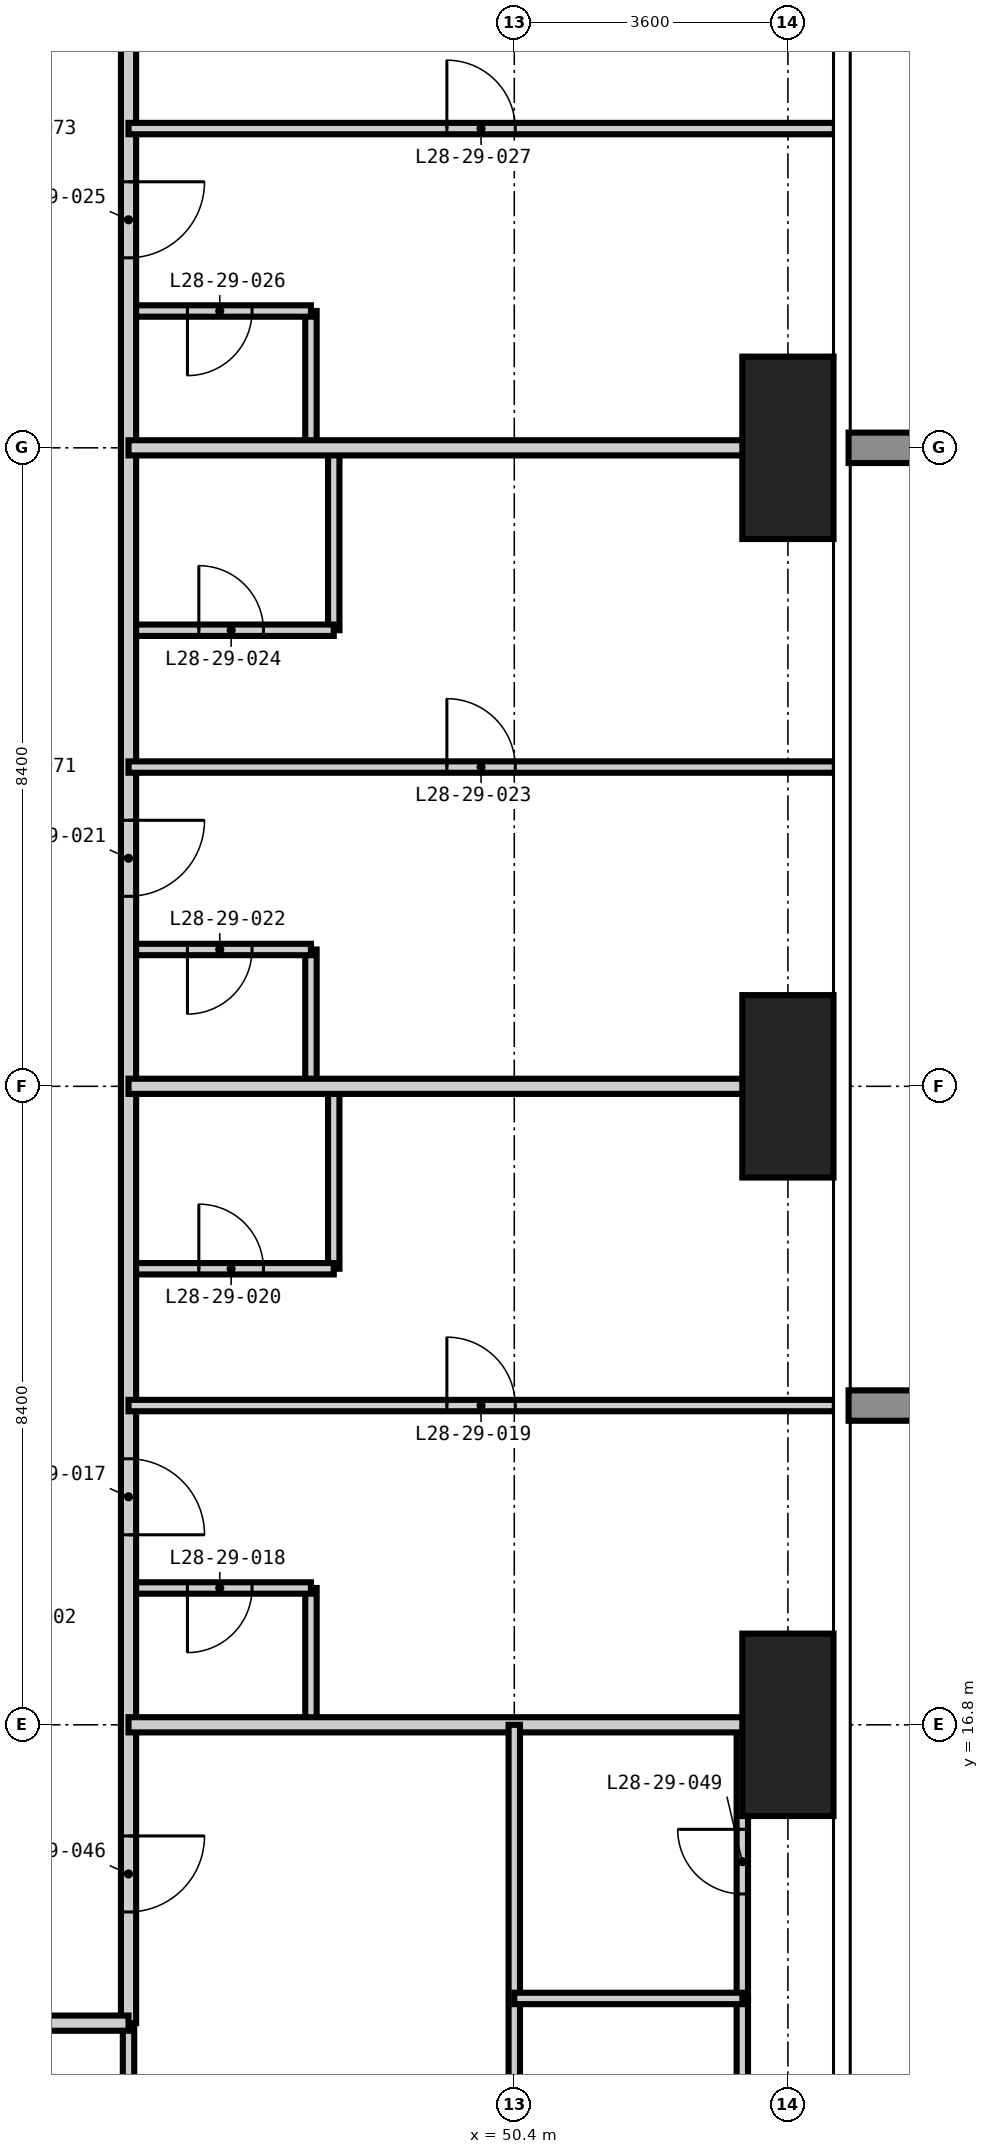
"""IFC4 building model, lengths in metres.
Left out: names, types, materials, properties, quantities, classifications, styles, units other than length and angle.
Written with IfcOpenShell. Run it as: python <this file> out.ifc"""

import sys

from ifc_helpers import new_model, si_unit, direction, frame, frame_2d, origin, origin_2d, place, context, subcontext, project, spatial, rectangle, extrude, element, fill, save


model = new_model("IFC4")
c1 = context("Model", 3, precision=1e-05, world=origin(), true_north=direction((0.0, 1.0)))
c2 = subcontext(c1, "Body", "Model", "MODEL_VIEW")
j1 = project(units=[si_unit("LENGTHUNIT", "METRE"), si_unit("PLANEANGLEUNIT", "RADIAN")], contexts=[c1])
p1 = place(None, origin())
s1 = spatial("IfcSite", under=j1, at=p1, CompositionType="ELEMENT")
p2 = place(p1, origin())
s2 = spatial("IfcBuilding", under=s1, at=p2, CompositionType="ELEMENT")
p3 = place(p2, frame((0.0, 0.0, 111.6)))
s3 = spatial("IfcBuildingStorey", under=s2, at=p3, CompositionType="ELEMENT", Elevation=111.6)
for number, where, z_axis, x_axis in (
    (1, (54.0, 16.8, -0.35), (0.0, 0.0, 1.0), (1.0, 0.0, 0.0)),
    (2, (54.0, 25.2, -0.35), (0.0, 0.0, 1.0), (1.0, 0.0, 0.0)),
    (3, (54.0, 33.6, -0.35), (0.0, 0.0, 1.0), (1.0, 0.0, 0.0)),
):
    element("IfcColumn", number, at=place(p3, frame(where, z_axis=z_axis, x_axis=x_axis)), inside=s3, PredefinedType="COLUMN", context=c2, shape_type="SweptSolid", body=[
        extrude(rectangle(XDim=1.2, YDim=2.4, at=origin_2d()), origin(), (0.0, 0.0, 1.0), 3.6),
    ])
p4 = place(p3, frame((45.325, 9.875, 0.0), z_axis=(0.0, 0.0, 1.0), x_axis=(0.0, 1.0, 0.0)))
e4 = element("IfcWall", 4, at=p4, inside=s3, PredefinedType="PARTITIONING", context=c2, shape_type="SweptSolid", body=[
    extrude(rectangle(XDim=3.0, YDim=0.15, at=frame_2d((1.5, 0.0))), origin(), (0.0, 0.0, 1.0), 3.25),
])
for number, where, z_axis, x_axis in (
    (5, (47.725, 16.8, 0.0), (0.0, 0.0, 1.0), (0.0, 1.0, 0.0)),
    (6, (47.725, 25.2, 0.0), (0.0, 0.0, 1.0), (0.0, 1.0, 0.0)),
):
    element("IfcWall", number, at=place(p3, frame(where, z_axis=z_axis, x_axis=x_axis)), inside=s3, PredefinedType="PARTITIONING", context=c2, shape_type="SweptSolid", body=[
        extrude(rectangle(XDim=1.8, YDim=0.15, at=frame_2d((0.9, 0.0))), origin(), (0.0, 0.0, 1.0), 3.25),
    ])
p5 = place(p3, frame((47.725, 33.6, 0.0), z_axis=(0.0, 0.0, 1.0), x_axis=(0.0, 1.0, 0.0)))
e7 = element("IfcWall", 7, at=p5, inside=s3, PredefinedType="PARTITIONING", context=c2, shape_type="SweptSolid", body=[
    extrude(rectangle(XDim=1.8, YDim=0.15, at=frame_2d((0.9, 0.0))), origin(), (0.0, 0.0, 1.0), 3.25),
])
p6 = place(p3, frame((48.025, 22.8, 0.0), z_axis=(0.0, 0.0, 1.0), x_axis=(0.0, 1.0, 0.0)))
e8 = element("IfcWall", 8, at=p6, inside=s3, PredefinedType="PARTITIONING", context=c2, shape_type="SweptSolid", body=[
    extrude(rectangle(XDim=2.4, YDim=0.15, at=frame_2d((1.2, 0.0))), origin(), (0.0, 0.0, 1.0), 3.25),
])
p7 = place(p3, frame((48.025, 31.2, 0.0), z_axis=(0.0, 0.0, 1.0), x_axis=(0.0, 1.0, 0.0)))
e9 = element("IfcWall", 9, at=p7, inside=s3, PredefinedType="PARTITIONING", context=c2, shape_type="SweptSolid", body=[
    extrude(rectangle(XDim=2.4, YDim=0.15, at=frame_2d((1.2, 0.0))), origin(), (0.0, 0.0, 1.0), 3.25),
])
p8 = place(p3, frame((53.4, 13.2, 0.0), z_axis=(0.0, 0.0, 1.0), x_axis=(0.0, 1.0, 0.0)))
e10 = element("IfcWall", 10, at=p8, inside=s3, PredefinedType="PARTITIONING", context=c2, shape_type="SweptSolid", body=[
    extrude(rectangle(XDim=3.6, YDim=0.15, at=frame_2d((1.8, 0.0))), origin(), (0.0, 0.0, 1.0), 3.25),
])
p9 = place(p8, frame((1.375, 0.0, 0.0)))
e11 = element("IfcOpeningElement", 11, at=p9, cuts=e10, PredefinedType="OPENING", context=c2, shape_type="SweptSolid", body=[
    extrude(rectangle(XDim=0.85, YDim=2.1, at=frame_2d((0.425, 1.05))), frame((0.0, 0.085, 0.0), z_axis=(0.0, -1.0, 0.0), x_axis=(1.0, 0.0, 0.0)), (0.0, 0.0, 1.0), 0.17),
])
p10 = place(p3, frame((45.325, 18.6, 0.0), z_axis=(0.0, 0.0, 1.0), x_axis=(1.0, 0.0, 0.0)))
e12 = element("IfcWall", 12, at=p10, inside=s3, PredefinedType="PARTITIONING", context=c2, shape_type="SweptSolid", body=[
    extrude(rectangle(XDim=2.4, YDim=0.15, at=frame_2d((1.2, 0.0))), origin(), (0.0, 0.0, 1.0), 3.25),
])
p11 = place(p10, frame((0.775, 0.0, 0.0)))
e13 = element("IfcOpeningElement", 13, at=p11, cuts=e12, PredefinedType="OPENING", context=c2, shape_type="SweptSolid", body=[
    extrude(rectangle(XDim=0.85, YDim=2.1, at=frame_2d((0.425, 1.05))), frame((0.0, 0.085, 0.0), z_axis=(0.0, -1.0, 0.0), x_axis=(1.0, 0.0, 0.0)), (0.0, 0.0, 1.0), 0.17),
])
p12 = place(p3, frame((45.325, 22.8, 0.0), z_axis=(0.0, 0.0, 1.0), x_axis=(1.0, 0.0, 0.0)))
e14 = element("IfcWall", 14, at=p12, inside=s3, PredefinedType="PARTITIONING", context=c2, shape_type="SweptSolid", body=[
    extrude(rectangle(XDim=2.7, YDim=0.15, at=frame_2d((1.35, 0.0))), origin(), (0.0, 0.0, 1.0), 3.25),
])
p13 = place(p12, frame((0.925, 0.0, 0.0)))
e15 = element("IfcOpeningElement", 15, at=p13, cuts=e14, PredefinedType="OPENING", context=c2, shape_type="SweptSolid", body=[
    extrude(rectangle(XDim=0.85, YDim=2.1, at=frame_2d((0.425, 1.05))), frame((0.0, 0.085, 0.0), z_axis=(0.0, -1.0, 0.0), x_axis=(1.0, 0.0, 0.0)), (0.0, 0.0, 1.0), 0.17),
])
p14 = place(p3, frame((45.325, 27.0, 0.0), z_axis=(0.0, 0.0, 1.0), x_axis=(1.0, 0.0, 0.0)))
e16 = element("IfcWall", 16, at=p14, inside=s3, PredefinedType="PARTITIONING", context=c2, shape_type="SweptSolid", body=[
    extrude(rectangle(XDim=2.4, YDim=0.15, at=frame_2d((1.2, 0.0))), origin(), (0.0, 0.0, 1.0), 3.25),
])
p15 = place(p14, frame((0.775, 0.0, 0.0)))
e17 = element("IfcOpeningElement", 17, at=p15, cuts=e16, PredefinedType="OPENING", context=c2, shape_type="SweptSolid", body=[
    extrude(rectangle(XDim=0.85, YDim=2.1, at=frame_2d((0.425, 1.05))), frame((0.0, 0.085, 0.0), z_axis=(0.0, -1.0, 0.0), x_axis=(1.0, 0.0, 0.0)), (0.0, 0.0, 1.0), 0.17),
])
p16 = place(p3, frame((45.325, 31.2, 0.0), z_axis=(0.0, 0.0, 1.0), x_axis=(1.0, 0.0, 0.0)))
e18 = element("IfcWall", 18, at=p16, inside=s3, PredefinedType="PARTITIONING", context=c2, shape_type="SweptSolid", body=[
    extrude(rectangle(XDim=2.7, YDim=0.15, at=frame_2d((1.35, 0.0))), origin(), (0.0, 0.0, 1.0), 3.25),
])
p17 = place(p16, frame((0.925, 0.0, 0.0)))
e19 = element("IfcOpeningElement", 19, at=p17, cuts=e18, PredefinedType="OPENING", context=c2, shape_type="SweptSolid", body=[
    extrude(rectangle(XDim=0.85, YDim=2.1, at=frame_2d((0.425, 1.05))), frame((0.0, 0.085, 0.0), z_axis=(0.0, -1.0, 0.0), x_axis=(1.0, 0.0, 0.0)), (0.0, 0.0, 1.0), 0.17),
])
p18 = place(p3, frame((45.325, 35.4, 0.0), z_axis=(0.0, 0.0, 1.0), x_axis=(1.0, 0.0, 0.0)))
e20 = element("IfcWall", 20, at=p18, inside=s3, PredefinedType="PARTITIONING", context=c2, shape_type="SweptSolid", body=[
    extrude(rectangle(XDim=2.4, YDim=0.15, at=frame_2d((1.2, 0.0))), origin(), (0.0, 0.0, 1.0), 3.25),
])
p19 = place(p18, frame((0.775, 0.0, 0.0)))
e21 = element("IfcOpeningElement", 21, at=p19, cuts=e20, PredefinedType="OPENING", context=c2, shape_type="SweptSolid", body=[
    extrude(rectangle(XDim=0.85, YDim=2.1, at=frame_2d((0.425, 1.05))), frame((0.0, 0.085, 0.0), z_axis=(0.0, -1.0, 0.0), x_axis=(1.0, 0.0, 0.0)), (0.0, 0.0, 1.0), 0.17),
])
p20 = place(p3, frame((45.325, 44.725, 0.0), z_axis=(0.0, 0.0, 1.0), x_axis=(0.0, -1.0, 0.0)))
e22 = element("IfcWall", 22, at=p20, inside=s3, PredefinedType="PARTITIONING", context=c2, shape_type="SweptSolid", body=[
    extrude(rectangle(XDim=31.85, YDim=0.2, at=frame_2d((15.925, 0.0))), origin(), (0.0, 0.0, 1.0), 3.25),
])
p21 = place(p20, frame((24.425, 0.0, 0.0)))
e23 = element("IfcOpeningElement", 23, at=p21, cuts=e22, PredefinedType="OPENING", context=c2, shape_type="SweptSolid", body=[
    extrude(rectangle(XDim=1.0, YDim=2.2, at=frame_2d((0.5, 1.1))), frame((0.0, 0.11, 0.0), z_axis=(0.0, -1.0, 0.0), x_axis=(1.0, 0.0, 0.0)), (0.0, 0.0, 1.0), 0.22),
])
p22 = place(p20, frame((16.025, 0.0, 0.0)))
e24 = element("IfcOpeningElement", 24, at=p22, cuts=e22, PredefinedType="OPENING", context=c2, shape_type="SweptSolid", body=[
    extrude(rectangle(XDim=1.0, YDim=2.2, at=frame_2d((0.5, 1.1))), frame((0.0, 0.11, 0.0), z_axis=(0.0, -1.0, 0.0), x_axis=(1.0, 0.0, 0.0)), (0.0, 0.0, 1.0), 0.22),
])
p23 = place(p20, frame((7.625, 0.0, 0.0)))
e25 = element("IfcOpeningElement", 25, at=p23, cuts=e22, PredefinedType="OPENING", context=c2, shape_type="SweptSolid", body=[
    extrude(rectangle(XDim=1.0, YDim=2.2, at=frame_2d((0.5, 1.1))), frame((0.0, 0.11, 0.0), z_axis=(0.0, -1.0, 0.0), x_axis=(1.0, 0.0, 0.0)), (0.0, 0.0, 1.0), 0.22),
])
p24 = place(p20, frame((29.387, 0.0, 0.0)))
e26 = element("IfcOpeningElement", 26, at=p24, cuts=e22, PredefinedType="OPENING", context=c2, shape_type="SweptSolid", body=[
    extrude(rectangle(XDim=1.0, YDim=2.2, at=frame_2d((0.5, 1.1))), frame((0.0, 0.11, 0.0), z_axis=(0.0, -1.0, 0.0), x_axis=(1.0, 0.0, 0.0)), (0.0, 0.0, 1.0), 0.22),
])
p25 = place(p20, frame((0.863, 0.0, 0.0)))
e27 = element("IfcOpeningElement", 27, at=p25, cuts=e22, PredefinedType="OPENING", context=c2, shape_type="SweptSolid", body=[
    extrude(rectangle(XDim=1.0, YDim=2.2, at=frame_2d((0.5, 1.1))), frame((0.0, 0.11, 0.0), z_axis=(0.0, -1.0, 0.0), x_axis=(1.0, 0.0, 0.0)), (0.0, 0.0, 1.0), 0.22),
])
p26 = place(p3, frame((45.325, 12.875, 0.0), z_axis=(0.0, 0.0, 1.0), x_axis=(-1.0, 0.0, 0.0)))
e28 = element("IfcWall", 28, at=p26, inside=s3, PredefinedType="PARTITIONING", context=c2, shape_type="SweptSolid", body=[
    extrude(rectangle(XDim=32.725, YDim=0.2, at=frame_2d((16.362, 0.0))), origin(), (0.0, 0.0, 1.0), 3.25),
])
p27 = place(p26, frame((22.625, 0.0, 0.0)))
e29 = element("IfcOpeningElement", 29, at=p27, cuts=e28, PredefinedType="OPENING", context=c2, shape_type="SweptSolid", body=[
    extrude(rectangle(XDim=1.0, YDim=2.2, at=frame_2d((0.5, 1.1))), frame((0.0, 0.11, 0.0), z_axis=(0.0, -1.0, 0.0), x_axis=(1.0, 0.0, 0.0)), (0.0, 0.0, 1.0), 0.22),
])
p28 = place(p26, frame((14.225, 0.0, 0.0)))
e30 = element("IfcOpeningElement", 30, at=p28, cuts=e28, PredefinedType="OPENING", context=c2, shape_type="SweptSolid", body=[
    extrude(rectangle(XDim=1.0, YDim=2.2, at=frame_2d((0.5, 1.1))), frame((0.0, 0.11, 0.0), z_axis=(0.0, -1.0, 0.0), x_axis=(1.0, 0.0, 0.0)), (0.0, 0.0, 1.0), 0.22),
])
p29 = place(p26, frame((5.825, 0.0, 0.0)))
e31 = element("IfcOpeningElement", 31, at=p29, cuts=e28, PredefinedType="OPENING", context=c2, shape_type="SweptSolid", body=[
    extrude(rectangle(XDim=1.0, YDim=2.2, at=frame_2d((0.5, 1.1))), frame((0.0, 0.11, 0.0), z_axis=(0.0, -1.0, 0.0), x_axis=(1.0, 0.0, 0.0)), (0.0, 0.0, 1.0), 0.22),
])
for number, where, z_axis, x_axis in (
    (32, (45.325, 16.8, 0.0), (0.0, 0.0, 1.0), (1.0, 0.0, 0.0)),
    (33, (45.325, 25.2, 0.0), (0.0, 0.0, 1.0), (1.0, 0.0, 0.0)),
    (34, (45.325, 33.6, 0.0), (0.0, 0.0, 1.0), (1.0, 0.0, 0.0)),
):
    element("IfcWall", number, at=place(p3, frame(where, z_axis=z_axis, x_axis=x_axis)), inside=s3, PredefinedType="PARTITIONING", context=c2, shape_type="SweptSolid", body=[
        extrude(rectangle(XDim=9.293, YDim=0.2, at=frame_2d((4.646, 0.0))), origin(), (0.0, 0.0, 1.0), 3.25),
    ])
p30 = place(p3, frame((50.4, -0.018, 0.0), z_axis=(0.0, 0.0, 1.0), x_axis=(0.0, 1.0, 0.0)))
e35 = element("IfcWall", 35, at=p30, inside=s3, PredefinedType="PARTITIONING", context=c2, shape_type="SweptSolid", body=[
    extrude(rectangle(XDim=16.818, YDim=0.15, at=frame_2d((8.409, 0.0))), origin(), (0.0, 0.0, 1.0), 3.25),
])
p31 = place(p30, frame((5.668, 0.0, 0.0)))
e36 = element("IfcOpeningElement", 36, at=p31, cuts=e35, PredefinedType="OPENING", context=c2, shape_type="SweptSolid", body=[
    extrude(rectangle(XDim=0.9, YDim=2.1, at=frame_2d((0.45, 1.05))), frame((0.0, 0.085, 0.0), z_axis=(0.0, -1.0, 0.0), x_axis=(1.0, 0.0, 0.0)), (0.0, 0.0, 1.0), 0.17),
])
p32 = place(p3, frame((53.4, 10.8, 0.0), z_axis=(0.0, 0.0, 1.0), x_axis=(0.0, 1.0, 0.0)))
e37 = element("IfcWall", 37, at=p32, inside=s3, PredefinedType="PARTITIONING", context=c2, shape_type="SweptSolid", body=[
    extrude(rectangle(XDim=2.4, YDim=0.15, at=frame_2d((1.2, 0.0))), origin(), (0.0, 0.0, 1.0), 3.25),
])
p33 = place(p3, frame((50.4, 13.2, 0.0), z_axis=(0.0, 0.0, 1.0), x_axis=(1.0, 0.0, 0.0)))
e38 = element("IfcWall", 38, at=p33, inside=s3, PredefinedType="PARTITIONING", context=c2, shape_type="SweptSolid", body=[
    extrude(rectangle(XDim=3.0, YDim=0.15, at=frame_2d((1.5, 0.0))), origin(), (0.0, 0.0, 1.0), 3.25),
])
p34 = place(p3, frame((45.325, 21.0, 0.0), z_axis=(0.0, 0.0, 1.0), x_axis=(1.0, 0.0, 0.0)))
e39 = element("IfcWall", 39, at=p34, inside=s3, PredefinedType="PARTITIONING", context=c2, shape_type="SweptSolid", body=[
    extrude(rectangle(XDim=9.293, YDim=0.15, at=frame_2d((4.646, 0.0))), origin(), (0.0, 0.0, 1.0), 3.25),
])
p35 = place(p34, frame((4.188, 0.0, 0.0)))
e40 = element("IfcOpeningElement", 40, at=p35, cuts=e39, PredefinedType="OPENING", context=c2, shape_type="SweptSolid", body=[
    extrude(rectangle(XDim=0.9, YDim=2.1, at=frame_2d((0.45, 1.05))), frame((0.0, 0.085, 0.0), z_axis=(0.0, -1.0, 0.0), x_axis=(1.0, 0.0, 0.0)), (0.0, 0.0, 1.0), 0.17),
])
p36 = place(p3, frame((45.325, 29.4, 0.0), z_axis=(0.0, 0.0, 1.0), x_axis=(1.0, 0.0, 0.0)))
e41 = element("IfcWall", 41, at=p36, inside=s3, PredefinedType="PARTITIONING", context=c2, shape_type="SweptSolid", body=[
    extrude(rectangle(XDim=9.293, YDim=0.15, at=frame_2d((4.646, 0.0))), origin(), (0.0, 0.0, 1.0), 3.25),
])
p37 = place(p36, frame((4.188, 0.0, 0.0)))
e42 = element("IfcOpeningElement", 42, at=p37, cuts=e41, PredefinedType="OPENING", context=c2, shape_type="SweptSolid", body=[
    extrude(rectangle(XDim=0.9, YDim=2.1, at=frame_2d((0.45, 1.05))), frame((0.0, 0.085, 0.0), z_axis=(0.0, -1.0, 0.0), x_axis=(1.0, 0.0, 0.0)), (0.0, 0.0, 1.0), 0.17),
])
p38 = place(p3, frame((45.325, 37.8, 0.0), z_axis=(0.0, 0.0, 1.0), x_axis=(1.0, 0.0, 0.0)))
e43 = element("IfcWall", 43, at=p38, inside=s3, PredefinedType="PARTITIONING", context=c2, shape_type="SweptSolid", body=[
    extrude(rectangle(XDim=9.293, YDim=0.15, at=frame_2d((4.646, 0.0))), origin(), (0.0, 0.0, 1.0), 3.25),
])
p39 = place(p38, frame((4.188, 0.0, 0.0)))
e44 = element("IfcOpeningElement", 44, at=p39, cuts=e43, PredefinedType="OPENING", context=c2, shape_type="SweptSolid", body=[
    extrude(rectangle(XDim=0.9, YDim=2.1, at=frame_2d((0.45, 1.05))), frame((0.0, 0.085, 0.0), z_axis=(0.0, -1.0, 0.0), x_axis=(1.0, 0.0, 0.0)), (0.0, 0.0, 1.0), 0.17),
])
p40 = place(p21, origin())
e45 = element("IfcDoor", 45, at=p40, inside=s3, OperationType="SINGLE_SWING_RIGHT", PredefinedType="DOOR", context=c2, shape_type="SweptSolid", body=[
    extrude(rectangle(XDim=1.0, YDim=2.2, at=frame_2d((0.5, 1.1))), frame((0.0, 0.025, 0.0), z_axis=(0.0, -1.0, 0.0), x_axis=(1.0, 0.0, 0.0)), (0.0, 0.0, 1.0), 0.05),
])
fill(e23, e45)
p41 = place(p11, frame((0.85, 0.0, 0.0), z_axis=(0.0, 0.0, 1.0), x_axis=(-1.0, 0.0, 0.0)))
e46 = element("IfcDoor", 46, at=p41, inside=s3, OperationType="SINGLE_SWING_RIGHT", PredefinedType="DOOR", context=c2, shape_type="SweptSolid", body=[
    extrude(rectangle(XDim=0.85, YDim=2.1, at=frame_2d((0.425, 1.05))), frame((0.0, 0.025, 0.0), z_axis=(0.0, -1.0, 0.0), x_axis=(1.0, 0.0, 0.0)), (0.0, 0.0, 1.0), 0.05),
])
fill(e13, e46)
p42 = place(p35, origin())
e47 = element("IfcDoor", 47, at=p42, inside=s3, OperationType="SINGLE_SWING_LEFT", PredefinedType="DOOR", context=c2, shape_type="SweptSolid", body=[
    extrude(rectangle(XDim=0.9, YDim=2.1, at=frame_2d((0.45, 1.05))), frame((0.0, 0.025, 0.0), z_axis=(0.0, -1.0, 0.0), x_axis=(1.0, 0.0, 0.0)), (0.0, 0.0, 1.0), 0.05),
])
fill(e40, e47)
p43 = place(p13, origin())
e48 = element("IfcDoor", 48, at=p43, inside=s3, OperationType="SINGLE_SWING_LEFT", PredefinedType="DOOR", context=c2, shape_type="SweptSolid", body=[
    extrude(rectangle(XDim=0.85, YDim=2.1, at=frame_2d((0.425, 1.05))), frame((0.0, 0.025, 0.0), z_axis=(0.0, -1.0, 0.0), x_axis=(1.0, 0.0, 0.0)), (0.0, 0.0, 1.0), 0.05),
])
fill(e15, e48)
p44 = place(p22, origin())
e49 = element("IfcDoor", 49, at=p44, inside=s3, OperationType="SINGLE_SWING_LEFT", PredefinedType="DOOR", context=c2, shape_type="SweptSolid", body=[
    extrude(rectangle(XDim=1.0, YDim=2.2, at=frame_2d((0.5, 1.1))), frame((0.0, 0.025, 0.0), z_axis=(0.0, -1.0, 0.0), x_axis=(1.0, 0.0, 0.0)), (0.0, 0.0, 1.0), 0.05),
])
fill(e24, e49)
p45 = place(p15, frame((0.85, 0.0, 0.0), z_axis=(0.0, 0.0, 1.0), x_axis=(-1.0, 0.0, 0.0)))
e50 = element("IfcDoor", 50, at=p45, inside=s3, OperationType="SINGLE_SWING_RIGHT", PredefinedType="DOOR", context=c2, shape_type="SweptSolid", body=[
    extrude(rectangle(XDim=0.85, YDim=2.1, at=frame_2d((0.425, 1.05))), frame((0.0, 0.025, 0.0), z_axis=(0.0, -1.0, 0.0), x_axis=(1.0, 0.0, 0.0)), (0.0, 0.0, 1.0), 0.05),
])
fill(e17, e50)
p46 = place(p37, origin())
e51 = element("IfcDoor", 51, at=p46, inside=s3, OperationType="SINGLE_SWING_LEFT", PredefinedType="DOOR", context=c2, shape_type="SweptSolid", body=[
    extrude(rectangle(XDim=0.9, YDim=2.1, at=frame_2d((0.45, 1.05))), frame((0.0, 0.025, 0.0), z_axis=(0.0, -1.0, 0.0), x_axis=(1.0, 0.0, 0.0)), (0.0, 0.0, 1.0), 0.05),
])
fill(e42, e51)
p47 = place(p17, origin())
e52 = element("IfcDoor", 52, at=p47, inside=s3, OperationType="SINGLE_SWING_LEFT", PredefinedType="DOOR", context=c2, shape_type="SweptSolid", body=[
    extrude(rectangle(XDim=0.85, YDim=2.1, at=frame_2d((0.425, 1.05))), frame((0.0, 0.025, 0.0), z_axis=(0.0, -1.0, 0.0), x_axis=(1.0, 0.0, 0.0)), (0.0, 0.0, 1.0), 0.05),
])
fill(e19, e52)
p48 = place(p23, origin())
e53 = element("IfcDoor", 53, at=p48, inside=s3, OperationType="SINGLE_SWING_LEFT", PredefinedType="DOOR", context=c2, shape_type="SweptSolid", body=[
    extrude(rectangle(XDim=1.0, YDim=2.2, at=frame_2d((0.5, 1.1))), frame((0.0, 0.025, 0.0), z_axis=(0.0, -1.0, 0.0), x_axis=(1.0, 0.0, 0.0)), (0.0, 0.0, 1.0), 0.05),
])
fill(e25, e53)
p49 = place(p19, frame((0.85, 0.0, 0.0), z_axis=(0.0, 0.0, 1.0), x_axis=(-1.0, 0.0, 0.0)))
e54 = element("IfcDoor", 54, at=p49, inside=s3, OperationType="SINGLE_SWING_RIGHT", PredefinedType="DOOR", context=c2, shape_type="SweptSolid", body=[
    extrude(rectangle(XDim=0.85, YDim=2.1, at=frame_2d((0.425, 1.05))), frame((0.0, 0.025, 0.0), z_axis=(0.0, -1.0, 0.0), x_axis=(1.0, 0.0, 0.0)), (0.0, 0.0, 1.0), 0.05),
])
fill(e21, e54)
p50 = place(p39, origin())
e55 = element("IfcDoor", 55, at=p50, inside=s3, OperationType="SINGLE_SWING_LEFT", PredefinedType="DOOR", context=c2, shape_type="SweptSolid", body=[
    extrude(rectangle(XDim=0.9, YDim=2.1, at=frame_2d((0.45, 1.05))), frame((0.0, 0.025, 0.0), z_axis=(0.0, -1.0, 0.0), x_axis=(1.0, 0.0, 0.0)), (0.0, 0.0, 1.0), 0.05),
])
fill(e44, e55)
p51 = place(p24, origin())
e56 = element("IfcDoor", 56, at=p51, inside=s3, OperationType="SINGLE_SWING_LEFT", PredefinedType="DOOR", context=c2, shape_type="SweptSolid", body=[
    extrude(rectangle(XDim=1.0, YDim=2.2, at=frame_2d((0.5, 1.1))), frame((0.0, 0.025, 0.0), z_axis=(0.0, -1.0, 0.0), x_axis=(1.0, 0.0, 0.0)), (0.0, 0.0, 1.0), 0.05),
])
fill(e26, e56)
p52 = place(p9, origin())
e57 = element("IfcDoor", 57, at=p52, inside=s3, OperationType="SINGLE_SWING_RIGHT", PredefinedType="DOOR", context=c2, shape_type="SweptSolid", body=[
    extrude(rectangle(XDim=0.85, YDim=2.1, at=frame_2d((0.425, 1.05))), frame((0.0, 0.025, 0.0), z_axis=(0.0, -1.0, 0.0), x_axis=(1.0, 0.0, 0.0)), (0.0, 0.0, 1.0), 0.05),
])
fill(e11, e57)
save(model, sys.argv[1])
